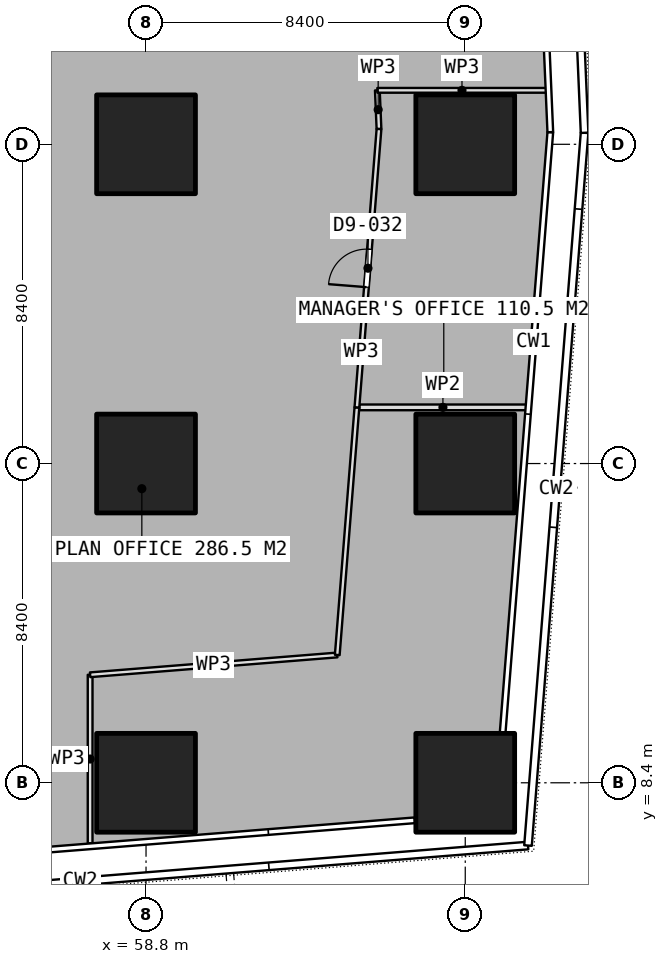
"""IFC4 building model, lengths in metres.
Left out: names, types, materials, properties, quantities, classifications, styles, units other than length and angle.
Written with IfcOpenShell. Run it as: python <this file> out.ifc"""

import sys

from ifc_helpers import new_model, si_unit, direction, frame, frame_2d, origin, origin_2d, place, context, subcontext, project, spatial, rectangle, extrude, element, fill, save


model = new_model("IFC4")
c1 = context("Model", 3, precision=1e-05, world=origin(), true_north=direction((0.0, 1.0)))
c2 = subcontext(c1, "Body", "Model", "MODEL_VIEW")
j1 = project(units=[si_unit("LENGTHUNIT", "METRE"), si_unit("PLANEANGLEUNIT", "RADIAN")], contexts=[c1])
p1 = place(None, origin())
s1 = spatial("IfcSite", under=j1, at=p1, CompositionType="ELEMENT")
p2 = place(p1, origin())
s2 = spatial("IfcBuilding", under=s1, at=p2, CompositionType="ELEMENT")
p3 = place(p2, frame((0.0, 0.0, 29.15)))
s3 = spatial("IfcBuildingStorey", under=s2, at=p3, CompositionType="ELEMENT", Elevation=29.15)
for number, where, z_axis, x_axis in (
    (1, (58.8, 8.4, 0.0), (0.0, 0.0, 1.0), (1.0, 0.0, 0.0)),
    (2, (58.8, 16.8, 0.0), (0.0, 0.0, 1.0), (1.0, 0.0, 0.0)),
    (3, (58.8, 25.2, 0.0), (0.0, 0.0, 1.0), (1.0, 0.0, 0.0)),
    (4, (67.2, 8.4, 0.0), (0.0, 0.0, 1.0), (1.0, 0.0, 0.0)),
    (5, (67.2, 16.8, 0.0), (0.0, 0.0, 1.0), (1.0, 0.0, 0.0)),
    (6, (67.2, 25.2, 0.0), (0.0, 0.0, 1.0), (1.0, 0.0, 0.0)),
):
    element("IfcColumn", number, at=place(p3, frame(where, z_axis=z_axis, x_axis=x_axis)), inside=s3, PredefinedType="COLUMN", context=c2, shape_type="SweptSolid", body=[
        extrude(rectangle(XDim=2.6, YDim=2.6, at=origin_2d()), origin(), (0.0, 0.0, 1.0), 3.75),
    ])
p4 = place(p3, frame((64.93, 25.602, 0.0), z_axis=(0.0, 0.0, 1.0), x_axis=(-0.04216869278, 0.999110505074, 0.0)))
e7 = element("IfcWall", 7, at=p4, inside=s3, PredefinedType="PARTITIONING", context=c2, shape_type="SweptSolid", body=[
    extrude(rectangle(XDim=1.019, YDim=0.125, at=frame_2d((0.51, 0.0))), origin(), (0.0, 0.0, 1.0), 3.5),
])
p5 = place(p3, frame((64.887, 26.62, 0.0), z_axis=(0.0, 0.0, 1.0), x_axis=(1.0, 0.0, 0.0)))
e8 = element("IfcWall", 8, at=p5, inside=s3, PredefinedType="PARTITIONING", context=c2, shape_type="SweptSolid", body=[
    extrude(rectangle(XDim=4.454, YDim=0.125, at=frame_2d((2.227, 0.0))), origin(), (0.0, 0.0, 1.0), 3.5),
])
p6 = place(p3, frame((57.329, 6.808, 0.0), z_axis=(0.0, 0.0, 1.0), x_axis=(0.0, 1.0, 0.0)))
e9 = element("IfcWall", 9, at=p6, inside=s3, PredefinedType="PARTITIONING", context=c2, shape_type="SweptSolid", body=[
    extrude(rectangle(XDim=4.434, YDim=0.125, at=frame_2d((2.217, 0.0))), origin(), (0.0, 0.0, 1.0), 3.5),
])
p7 = place(p3, frame((57.329, 11.242, 0.0), z_axis=(0.0, 0.0, 1.0), x_axis=(0.99680599034, 0.079861239803, 0.0)))
e10 = element("IfcWall", 10, at=p7, inside=s3, PredefinedType="PARTITIONING", context=c2, shape_type="SweptSolid", body=[
    extrude(rectangle(XDim=6.524, YDim=0.125, at=frame_2d((3.262, 0.0))), origin(), (0.0, 0.0, 1.0), 3.5),
])
p8 = place(p3, frame((63.832, 11.763, 0.0), z_axis=(0.0, 0.0, 1.0), x_axis=(0.079130444636, 0.996864269964, 0.0)))
e11 = element("IfcWall", 11, at=p8, inside=s3, PredefinedType="PARTITIONING", context=c2, shape_type="SweptSolid", body=[
    extrude(rectangle(XDim=6.535, YDim=0.125, at=frame_2d((3.267, 0.0))), origin(), (0.0, 0.0, 1.0), 3.5),
])
p9 = place(p3, frame((64.349, 18.277, 0.0), z_axis=(0.0, 0.0, 1.0), x_axis=(0.079043976211, 0.996871129999, 0.0)))
e12 = element("IfcWall", 12, at=p9, inside=s3, PredefinedType="PARTITIONING", context=c2, shape_type="SweptSolid", body=[
    extrude(rectangle(XDim=7.348, YDim=0.125, at=frame_2d((3.674, 0.0))), origin(), (0.0, 0.0, 1.0), 3.5),
])
p10 = place(p9, frame((3.174, 0.0, 0.0)))
e13 = element("IfcOpeningElement", 13, at=p10, cuts=e12, PredefinedType="OPENING", context=c2, shape_type="SweptSolid", body=[
    extrude(rectangle(XDim=1.0, YDim=2.1, at=frame_2d((0.5, 1.05))), frame((0.0, 0.073, 0.0), z_axis=(0.0, -1.0, 0.0), x_axis=(1.0, 0.0, 0.0)), (0.0, 0.0, 1.0), 0.145),
])
p11 = place(p3, frame((64.412, 18.278, 0.0), z_axis=(0.0, 0.0, 1.0), x_axis=(1.0, 0.0, 0.0)))
e14 = element("IfcWall", 14, at=p11, inside=s3, PredefinedType="PARTITIONING", context=c2, shape_type="SweptSolid", body=[
    extrude(rectangle(XDim=4.401, YDim=0.15, at=frame_2d((2.2, 0.0))), origin(), (0.0, 0.0, 1.0), 3.5),
])
p12 = place(p10, origin())
e15 = element("IfcDoor", 15, at=p12, inside=s3, OperationType="SINGLE_SWING_LEFT", PredefinedType="DOOR", context=c2, shape_type="SweptSolid", body=[
    extrude(rectangle(XDim=1.0, YDim=2.1, at=frame_2d((0.5, 1.05))), frame((0.0, 0.025, 0.0), z_axis=(0.0, -1.0, 0.0), x_axis=(1.0, 0.0, 0.0)), (0.0, 0.0, 1.0), 0.05),
])
fill(e13, e15)
save(model, sys.argv[1])
